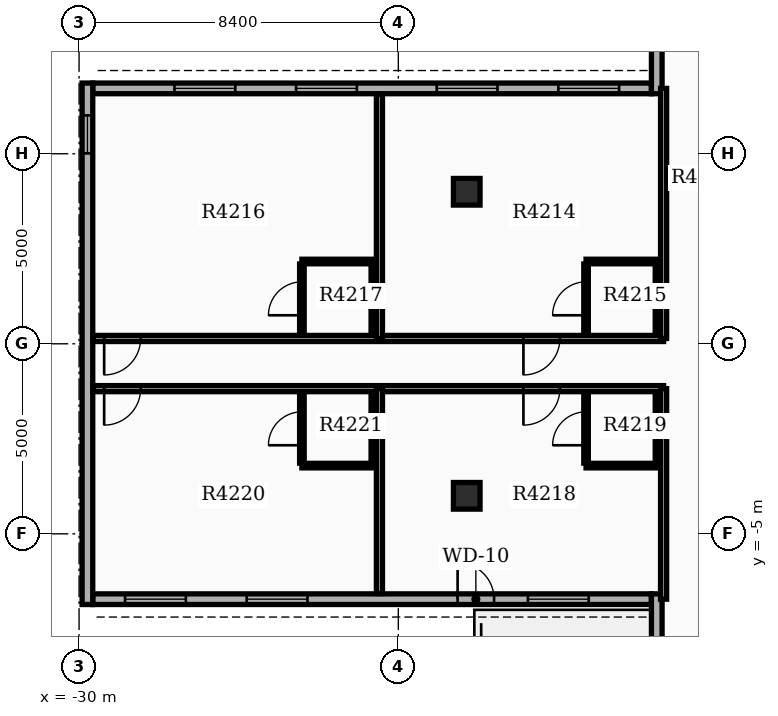
"""IFC4 building model, lengths in metres.
Left out: names, types, materials, properties, quantities, classifications, styles, units other than length and angle.
Written with IfcOpenShell. Run it as: python <this file> out.ifc"""

import sys

from ifc_helpers import new_model, si_unit, direction, frame, frame_2d, origin, origin_2d, place, context, subcontext, project, spatial, rectangle, extrude, element, fill, save


model = new_model("IFC4")
c1 = context("Model", 3, precision=1e-05, world=origin(), true_north=direction((0.0, 1.0)))
c2 = subcontext(c1, "Body", "Model", "MODEL_VIEW")
j1 = project(units=[si_unit("LENGTHUNIT", "METRE"), si_unit("PLANEANGLEUNIT", "RADIAN")], contexts=[c1])
p1 = place(None, origin())
s1 = spatial("IfcSite", under=j1, at=p1, CompositionType="ELEMENT")
p2 = place(p1, origin())
s2 = spatial("IfcBuilding", under=s1, at=p2, CompositionType="ELEMENT")
p3 = place(p2, frame((0.0, 0.0, 265.5)))
s3 = spatial("IfcBuildingStorey", under=s2, at=p3, CompositionType="ELEMENT", Elevation=265.5)
for number, where, z_axis, x_axis in (
    (1, (-19.8, -4.0, 0.0), (0.0, 0.0, 1.0), (1.0, 0.0, 0.0)),
    (2, (-19.8, 4.0, 0.0), (0.0, 0.0, 1.0), (1.0, 0.0, 0.0)),
):
    element("IfcColumn", number, at=place(p3, frame(where, z_axis=z_axis, x_axis=x_axis)), inside=s3, PredefinedType="COLUMN", context=c2, shape_type="SweptSolid", body=[
        extrude(rectangle(XDim=0.7, YDim=0.7, at=origin_2d()), origin(), (0.0, 0.0, 1.0), 3.9),
    ])
p4 = place(p3, frame((-14.94, 6.72, 0.0), z_axis=(0.0, 0.0, 1.0), x_axis=(-1.0, 0.0, 0.0)))
e3 = element("IfcWall", 3, at=p4, inside=s3, PredefinedType="STANDARD", context=c2, shape_type="SweptSolid", body=[
    extrude(rectangle(XDim=14.7, YDim=0.28, at=frame_2d((7.35, 0.0))), origin(), (0.0, 0.0, 1.0), 3.18),
])
p5 = place(p4, frame((0.85, 0.0, 0.8)))
e4 = element("IfcOpeningElement", 4, at=p5, cuts=e3, PredefinedType="OPENING", context=c2, shape_type="SweptSolid", body=[
    extrude(rectangle(XDim=1.6, YDim=1.7, at=frame_2d((0.8, 0.85))), frame((0.0, 0.15, 0.0), z_axis=(0.0, -1.0, 0.0), x_axis=(1.0, 0.0, 0.0)), (0.0, 0.0, 1.0), 0.3),
])
p6 = place(p4, frame((4.05, 0.0, 0.8)))
e5 = element("IfcOpeningElement", 5, at=p6, cuts=e3, PredefinedType="OPENING", context=c2, shape_type="SweptSolid", body=[
    extrude(rectangle(XDim=1.6, YDim=1.7, at=frame_2d((0.8, 0.85))), frame((0.0, 0.15, 0.0), z_axis=(0.0, -1.0, 0.0), x_axis=(1.0, 0.0, 0.0)), (0.0, 0.0, 1.0), 0.3),
])
p7 = place(p4, frame((7.75, 0.0, 0.8)))
e6 = element("IfcOpeningElement", 6, at=p7, cuts=e3, PredefinedType="OPENING", context=c2, shape_type="SweptSolid", body=[
    extrude(rectangle(XDim=1.6, YDim=1.7, at=frame_2d((0.8, 0.85))), frame((0.0, 0.15, 0.0), z_axis=(0.0, -1.0, 0.0), x_axis=(1.0, 0.0, 0.0)), (0.0, 0.0, 1.0), 0.3),
])
p8 = place(p4, frame((10.95, 0.0, 0.8)))
e7 = element("IfcOpeningElement", 7, at=p8, cuts=e3, PredefinedType="OPENING", context=c2, shape_type="SweptSolid", body=[
    extrude(rectangle(XDim=1.6, YDim=1.7, at=frame_2d((0.8, 0.85))), frame((0.0, 0.15, 0.0), z_axis=(0.0, -1.0, 0.0), x_axis=(1.0, 0.0, 0.0)), (0.0, 0.0, 1.0), 0.3),
])
p9 = place(p3, frame((-29.64, -6.72, 0.0), z_axis=(0.0, 0.0, 1.0), x_axis=(1.0, 0.0, 0.0)))
e8 = element("IfcWall", 8, at=p9, inside=s3, PredefinedType="STANDARD", context=c2, shape_type="SweptSolid", body=[
    extrude(rectangle(XDim=14.7, YDim=0.28, at=frame_2d((7.35, 0.0))), origin(), (0.0, 0.0, 1.0), 3.18),
])
p10 = place(p9, frame((0.85, 0.0, 0.8)))
e9 = element("IfcOpeningElement", 9, at=p10, cuts=e8, PredefinedType="OPENING", context=c2, shape_type="SweptSolid", body=[
    extrude(rectangle(XDim=1.6, YDim=1.7, at=frame_2d((0.8, 0.85))), frame((0.0, 0.15, 0.0), z_axis=(0.0, -1.0, 0.0), x_axis=(1.0, 0.0, 0.0)), (0.0, 0.0, 1.0), 0.3),
])
p11 = place(p9, frame((4.05, 0.0, 0.8)))
e10 = element("IfcOpeningElement", 10, at=p11, cuts=e8, PredefinedType="OPENING", context=c2, shape_type="SweptSolid", body=[
    extrude(rectangle(XDim=1.6, YDim=1.7, at=frame_2d((0.8, 0.85))), frame((0.0, 0.15, 0.0), z_axis=(0.0, -1.0, 0.0), x_axis=(1.0, 0.0, 0.0)), (0.0, 0.0, 1.0), 0.3),
])
p12 = place(p9, frame((11.45, 0.0, 0.8)))
e11 = element("IfcOpeningElement", 11, at=p12, cuts=e8, PredefinedType="OPENING", context=c2, shape_type="SweptSolid", body=[
    extrude(rectangle(XDim=1.6, YDim=1.7, at=frame_2d((0.8, 0.85))), frame((0.0, 0.15, 0.0), z_axis=(0.0, -1.0, 0.0), x_axis=(1.0, 0.0, 0.0)), (0.0, 0.0, 1.0), 0.3),
])
p13 = place(p9, frame((9.6, 0.0, 0.0)))
e12 = element("IfcOpeningElement", 12, at=p13, cuts=e8, PredefinedType="OPENING", context=c2, shape_type="SweptSolid", body=[
    extrude(rectangle(XDim=0.96, YDim=2.1, at=frame_2d((0.48, 1.05))), frame((0.0, 0.15, 0.0), z_axis=(0.0, -1.0, 0.0), x_axis=(1.0, 0.0, 0.0)), (0.0, 0.0, 1.0), 0.3),
])
p14 = place(p3, frame((-29.78, 6.86, 0.0), z_axis=(0.0, 0.0, 1.0), x_axis=(0.0, -1.0, 0.0)))
e13 = element("IfcWall", 13, at=p14, inside=s3, PredefinedType="STANDARD", context=c2, shape_type="SweptSolid", body=[
    extrude(rectangle(XDim=13.72, YDim=0.28, at=frame_2d((6.86, 0.0))), origin(), (0.0, 0.0, 1.0), 3.18),
])
p15 = place(p14, frame((0.85, 0.0, 0.85)))
e14 = element("IfcOpeningElement", 14, at=p15, cuts=e13, PredefinedType="OPENING", context=c2, shape_type="SweptSolid", body=[
    extrude(rectangle(XDim=1.0, YDim=1.5, at=frame_2d((0.5, 0.75))), frame((0.0, 0.15, 0.0), z_axis=(0.0, -1.0, 0.0), x_axis=(1.0, 0.0, 0.0)), (0.0, 0.0, 1.0), 0.3),
])
for number, where, z_axis, x_axis in (
    (15, (-14.8, 6.58, 0.0), (0.0, 0.0, 1.0), (0.0, 1.0, 0.0)),
    (16, (-14.8, -6.58, 0.0), (0.0, 0.0, 1.0), (0.0, -1.0, 0.0)),
):
    element("IfcWall", number, at=place(p3, frame(where, z_axis=z_axis, x_axis=x_axis)), inside=s3, PredefinedType="STANDARD", context=c2, shape_type="SweptSolid", body=[
        extrude(rectangle(XDim=6.86, YDim=0.28, at=frame_2d((3.43, 0.0))), origin(), (0.0, 0.0, 1.0), 3.18),
    ])
p16 = place(p3, frame((-14.62, 0.14, 0.0), z_axis=(0.0, 0.0, 1.0), x_axis=(-1.0, 0.0, 0.0)))
e17 = element("IfcWall", 17, at=p16, inside=s3, PredefinedType="PARTITIONING", context=c2, shape_type="SweptSolid", body=[
    extrude(rectangle(XDim=15.012, YDim=0.16, at=frame_2d((7.506, 0.0))), origin(), (0.0, 0.0, 1.0), 3.17),
])
p17 = place(p16, frame((2.728, 0.0, 0.0)))
e18 = element("IfcOpeningElement", 18, at=p17, cuts=e17, PredefinedType="OPENING", context=c2, shape_type="SweptSolid", body=[
    extrude(rectangle(XDim=0.96, YDim=2.15, at=frame_2d((0.48, 1.075))), frame((0.0, 0.09, 0.0), z_axis=(0.0, -1.0, 0.0), x_axis=(1.0, 0.0, 0.0)), (0.0, 0.0, 1.0), 0.18),
])
p18 = place(p16, frame((13.76, 0.0, 0.0)))
e19 = element("IfcOpeningElement", 19, at=p18, cuts=e17, PredefinedType="OPENING", context=c2, shape_type="SweptSolid", body=[
    extrude(rectangle(XDim=0.96, YDim=2.15, at=frame_2d((0.48, 1.075))), frame((0.0, 0.09, 0.0), z_axis=(0.0, -1.0, 0.0), x_axis=(1.0, 0.0, 0.0)), (0.0, 0.0, 1.0), 0.18),
])
p19 = place(p3, frame((-14.62, 0.14, 0.0), z_axis=(0.0, 0.0, 1.0), x_axis=(0.0, 1.0, 0.0)))
e20 = element("IfcWall", 20, at=p19, inside=s3, PredefinedType="PARTITIONING", context=c2, shape_type="SweptSolid", body=[
    extrude(rectangle(XDim=6.58, YDim=0.16, at=frame_2d((3.29, 0.0))), origin(), (0.0, 0.0, 1.0), 3.17),
])
p20 = place(p3, frame((-22.097, 0.14, 0.0), z_axis=(0.0, 0.0, 1.0), x_axis=(0.0, 1.0, 0.0)))
e21 = element("IfcWall", 21, at=p20, inside=s3, PredefinedType="PARTITIONING", context=c2, shape_type="SweptSolid", body=[
    extrude(rectangle(XDim=6.432, YDim=0.16, at=frame_2d((3.216, 0.0))), origin(), (0.0, 0.0, 1.0), 3.17),
])
p21 = place(p3, frame((-16.66, 0.28, 0.0), z_axis=(0.0, 0.0, 1.0), x_axis=(0.0, 1.0, 0.0)))
e22 = element("IfcWall", 22, at=p21, inside=s3, PredefinedType="PARTITIONING", context=c2, shape_type="SweptSolid", body=[
    extrude(rectangle(XDim=1.82, YDim=0.12, at=frame_2d((0.91, 0.0))), origin(), (0.0, 0.0, 1.0), 3.17),
])
p22 = place(p21, frame((0.47, 0.0, 0.0)))
e23 = element("IfcOpeningElement", 23, at=p22, cuts=e22, PredefinedType="OPENING", context=c2, shape_type="SweptSolid", body=[
    extrude(rectangle(XDim=0.88, YDim=2.1, at=frame_2d((0.44, 1.05))), frame((0.0, 0.07, 0.0), z_axis=(0.0, -1.0, 0.0), x_axis=(1.0, 0.0, 0.0)), (0.0, 0.0, 1.0), 0.14),
])
p23 = place(p3, frame((-14.78, 0.28, 0.0), z_axis=(0.0, 0.0, 1.0), x_axis=(0.0, 1.0, 0.0)))
e24 = element("IfcWall", 24, at=p23, inside=s3, PredefinedType="PARTITIONING", context=c2, shape_type="SweptSolid", body=[
    extrude(rectangle(XDim=1.82, YDim=0.12, at=frame_2d((0.91, 0.0))), origin(), (0.0, 0.0, 1.0), 3.17),
])
p24 = place(p3, frame((-14.78, 2.165, 0.0), z_axis=(0.0, 0.0, 1.0), x_axis=(-1.0, 0.0, 0.0)))
e25 = element("IfcWall", 25, at=p24, inside=s3, PredefinedType="PARTITIONING", context=c2, shape_type="SweptSolid", body=[
    extrude(rectangle(XDim=1.88, YDim=0.12, at=frame_2d((0.94, 0.0))), origin(), (0.0, 0.0, 1.0), 3.17),
])
p25 = place(p3, frame((-24.137, 0.28, 0.0), z_axis=(0.0, 0.0, 1.0), x_axis=(0.0, 1.0, 0.0)))
e26 = element("IfcWall", 26, at=p25, inside=s3, PredefinedType="PARTITIONING", context=c2, shape_type="SweptSolid", body=[
    extrude(rectangle(XDim=1.82, YDim=0.12, at=frame_2d((0.91, 0.0))), origin(), (0.0, 0.0, 1.0), 3.17),
])
p26 = place(p25, frame((0.47, 0.0, 0.0)))
e27 = element("IfcOpeningElement", 27, at=p26, cuts=e26, PredefinedType="OPENING", context=c2, shape_type="SweptSolid", body=[
    extrude(rectangle(XDim=0.88, YDim=2.1, at=frame_2d((0.44, 1.05))), frame((0.0, 0.07, 0.0), z_axis=(0.0, -1.0, 0.0), x_axis=(1.0, 0.0, 0.0)), (0.0, 0.0, 1.0), 0.14),
])
p27 = place(p3, frame((-22.257, 0.28, 0.0), z_axis=(0.0, 0.0, 1.0), x_axis=(0.0, 1.0, 0.0)))
e28 = element("IfcWall", 28, at=p27, inside=s3, PredefinedType="PARTITIONING", context=c2, shape_type="SweptSolid", body=[
    extrude(rectangle(XDim=1.82, YDim=0.12, at=frame_2d((0.91, 0.0))), origin(), (0.0, 0.0, 1.0), 3.17),
])
p28 = place(p3, frame((-22.257, 2.165, 0.0), z_axis=(0.0, 0.0, 1.0), x_axis=(-1.0, 0.0, 0.0)))
e29 = element("IfcWall", 29, at=p28, inside=s3, PredefinedType="PARTITIONING", context=c2, shape_type="SweptSolid", body=[
    extrude(rectangle(XDim=1.88, YDim=0.12, at=frame_2d((0.94, 0.0))), origin(), (0.0, 0.0, 1.0), 3.17),
])
p29 = place(p3, frame((-14.62, -1.18, 0.0), z_axis=(0.0, 0.0, 1.0), x_axis=(-1.0, 0.0, 0.0)))
e30 = element("IfcWall", 30, at=p29, inside=s3, PredefinedType="PARTITIONING", context=c2, shape_type="SweptSolid", body=[
    extrude(rectangle(XDim=15.012, YDim=0.16, at=frame_2d((7.506, 0.0))), origin(), (0.0, 0.0, 1.0), 3.17),
])
p30 = place(p29, frame((2.728, 0.0, 0.0)))
e31 = element("IfcOpeningElement", 31, at=p30, cuts=e30, PredefinedType="OPENING", context=c2, shape_type="SweptSolid", body=[
    extrude(rectangle(XDim=0.96, YDim=2.15, at=frame_2d((0.48, 1.075))), frame((0.0, 0.09, 0.0), z_axis=(0.0, -1.0, 0.0), x_axis=(1.0, 0.0, 0.0)), (0.0, 0.0, 1.0), 0.18),
])
p31 = place(p29, frame((13.76, 0.0, 0.0)))
e32 = element("IfcOpeningElement", 32, at=p31, cuts=e30, PredefinedType="OPENING", context=c2, shape_type="SweptSolid", body=[
    extrude(rectangle(XDim=0.96, YDim=2.15, at=frame_2d((0.48, 1.075))), frame((0.0, 0.09, 0.0), z_axis=(0.0, -1.0, 0.0), x_axis=(1.0, 0.0, 0.0)), (0.0, 0.0, 1.0), 0.18),
])
p32 = place(p3, frame((-14.62, -1.18, 0.0), z_axis=(0.0, 0.0, 1.0), x_axis=(0.0, -1.0, 0.0)))
e33 = element("IfcWall", 33, at=p32, inside=s3, PredefinedType="PARTITIONING", context=c2, shape_type="SweptSolid", body=[
    extrude(rectangle(XDim=5.54, YDim=0.16, at=frame_2d((2.77, 0.0))), origin(), (0.0, 0.0, 1.0), 3.17),
])
p33 = place(p3, frame((-22.097, -1.18, 0.0), z_axis=(0.0, 0.0, 1.0), x_axis=(0.0, -1.0, 0.0)))
e34 = element("IfcWall", 34, at=p33, inside=s3, PredefinedType="PARTITIONING", context=c2, shape_type="SweptSolid", body=[
    extrude(rectangle(XDim=5.392, YDim=0.16, at=frame_2d((2.696, 0.0))), origin(), (0.0, 0.0, 1.0), 3.17),
])
p34 = place(p3, frame((-16.66, -3.14, 0.0), z_axis=(0.0, 0.0, 1.0), x_axis=(0.0, 1.0, 0.0)))
e35 = element("IfcWall", 35, at=p34, inside=s3, PredefinedType="PARTITIONING", context=c2, shape_type="SweptSolid", body=[
    extrude(rectangle(XDim=1.82, YDim=0.12, at=frame_2d((0.91, 0.0))), origin(), (0.0, 0.0, 1.0), 3.17),
])
p35 = place(p34, frame((0.47, 0.0, 0.0)))
e36 = element("IfcOpeningElement", 36, at=p35, cuts=e35, PredefinedType="OPENING", context=c2, shape_type="SweptSolid", body=[
    extrude(rectangle(XDim=0.88, YDim=2.1, at=frame_2d((0.44, 1.05))), frame((0.0, 0.07, 0.0), z_axis=(0.0, -1.0, 0.0), x_axis=(1.0, 0.0, 0.0)), (0.0, 0.0, 1.0), 0.14),
])
p36 = place(p3, frame((-14.78, -3.14, 0.0), z_axis=(0.0, 0.0, 1.0), x_axis=(0.0, 1.0, 0.0)))
e37 = element("IfcWall", 37, at=p36, inside=s3, PredefinedType="PARTITIONING", context=c2, shape_type="SweptSolid", body=[
    extrude(rectangle(XDim=1.82, YDim=0.12, at=frame_2d((0.91, 0.0))), origin(), (0.0, 0.0, 1.0), 3.17),
])
p37 = place(p3, frame((-14.78, -3.205, 0.0), z_axis=(0.0, 0.0, 1.0), x_axis=(-1.0, 0.0, 0.0)))
e38 = element("IfcWall", 38, at=p37, inside=s3, PredefinedType="PARTITIONING", context=c2, shape_type="SweptSolid", body=[
    extrude(rectangle(XDim=1.88, YDim=0.12, at=frame_2d((0.94, 0.0))), origin(), (0.0, 0.0, 1.0), 3.17),
])
p38 = place(p3, frame((-24.137, -3.14, 0.0), z_axis=(0.0, 0.0, 1.0), x_axis=(0.0, 1.0, 0.0)))
e39 = element("IfcWall", 39, at=p38, inside=s3, PredefinedType="PARTITIONING", context=c2, shape_type="SweptSolid", body=[
    extrude(rectangle(XDim=1.82, YDim=0.12, at=frame_2d((0.91, 0.0))), origin(), (0.0, 0.0, 1.0), 3.17),
])
p39 = place(p38, frame((0.47, 0.0, 0.0)))
e40 = element("IfcOpeningElement", 40, at=p39, cuts=e39, PredefinedType="OPENING", context=c2, shape_type="SweptSolid", body=[
    extrude(rectangle(XDim=0.88, YDim=2.1, at=frame_2d((0.44, 1.05))), frame((0.0, 0.07, 0.0), z_axis=(0.0, -1.0, 0.0), x_axis=(1.0, 0.0, 0.0)), (0.0, 0.0, 1.0), 0.14),
])
p40 = place(p3, frame((-22.257, -3.14, 0.0), z_axis=(0.0, 0.0, 1.0), x_axis=(0.0, 1.0, 0.0)))
e41 = element("IfcWall", 41, at=p40, inside=s3, PredefinedType="PARTITIONING", context=c2, shape_type="SweptSolid", body=[
    extrude(rectangle(XDim=1.82, YDim=0.12, at=frame_2d((0.91, 0.0))), origin(), (0.0, 0.0, 1.0), 3.17),
])
p41 = place(p3, frame((-22.257, -3.205, 0.0), z_axis=(0.0, 0.0, 1.0), x_axis=(-1.0, 0.0, 0.0)))
e42 = element("IfcWall", 42, at=p41, inside=s3, PredefinedType="PARTITIONING", context=c2, shape_type="SweptSolid", body=[
    extrude(rectangle(XDim=1.88, YDim=0.12, at=frame_2d((0.94, 0.0))), origin(), (0.0, 0.0, 1.0), 3.17),
])
p42 = place(p5, origin())
e43 = element("IfcWindow", 43, at=p42, inside=s3, PartitioningType="SINGLE_PANEL", PredefinedType="WINDOW", context=c2, shape_type="SweptSolid", body=[
    extrude(rectangle(XDim=1.6, YDim=1.7, at=frame_2d((0.8, 0.85))), frame((0.0, 0.03, 0.0), z_axis=(0.0, -1.0, 0.0), x_axis=(1.0, 0.0, 0.0)), (0.0, 0.0, 1.0), 0.06),
])
fill(e4, e43)
p43 = place(p6, origin())
e44 = element("IfcWindow", 44, at=p43, inside=s3, PartitioningType="SINGLE_PANEL", PredefinedType="WINDOW", context=c2, shape_type="SweptSolid", body=[
    extrude(rectangle(XDim=1.6, YDim=1.7, at=frame_2d((0.8, 0.85))), frame((0.0, 0.03, 0.0), z_axis=(0.0, -1.0, 0.0), x_axis=(1.0, 0.0, 0.0)), (0.0, 0.0, 1.0), 0.06),
])
fill(e5, e44)
p44 = place(p7, origin())
e45 = element("IfcWindow", 45, at=p44, inside=s3, PartitioningType="SINGLE_PANEL", PredefinedType="WINDOW", context=c2, shape_type="SweptSolid", body=[
    extrude(rectangle(XDim=1.6, YDim=1.7, at=frame_2d((0.8, 0.85))), frame((0.0, 0.03, 0.0), z_axis=(0.0, -1.0, 0.0), x_axis=(1.0, 0.0, 0.0)), (0.0, 0.0, 1.0), 0.06),
])
fill(e6, e45)
p45 = place(p8, origin())
e46 = element("IfcWindow", 46, at=p45, inside=s3, PartitioningType="SINGLE_PANEL", PredefinedType="WINDOW", context=c2, shape_type="SweptSolid", body=[
    extrude(rectangle(XDim=1.6, YDim=1.7, at=frame_2d((0.8, 0.85))), frame((0.0, 0.03, 0.0), z_axis=(0.0, -1.0, 0.0), x_axis=(1.0, 0.0, 0.0)), (0.0, 0.0, 1.0), 0.06),
])
fill(e7, e46)
p46 = place(p10, origin())
e47 = element("IfcWindow", 47, at=p46, inside=s3, PartitioningType="SINGLE_PANEL", PredefinedType="WINDOW", context=c2, shape_type="SweptSolid", body=[
    extrude(rectangle(XDim=1.6, YDim=1.7, at=frame_2d((0.8, 0.85))), frame((0.0, 0.03, 0.0), z_axis=(0.0, -1.0, 0.0), x_axis=(1.0, 0.0, 0.0)), (0.0, 0.0, 1.0), 0.06),
])
fill(e9, e47)
p47 = place(p11, origin())
e48 = element("IfcWindow", 48, at=p47, inside=s3, PartitioningType="SINGLE_PANEL", PredefinedType="WINDOW", context=c2, shape_type="SweptSolid", body=[
    extrude(rectangle(XDim=1.6, YDim=1.7, at=frame_2d((0.8, 0.85))), frame((0.0, 0.03, 0.0), z_axis=(0.0, -1.0, 0.0), x_axis=(1.0, 0.0, 0.0)), (0.0, 0.0, 1.0), 0.06),
])
fill(e10, e48)
p48 = place(p12, origin())
e49 = element("IfcWindow", 49, at=p48, inside=s3, PartitioningType="SINGLE_PANEL", PredefinedType="WINDOW", context=c2, shape_type="SweptSolid", body=[
    extrude(rectangle(XDim=1.6, YDim=1.7, at=frame_2d((0.8, 0.85))), frame((0.0, 0.03, 0.0), z_axis=(0.0, -1.0, 0.0), x_axis=(1.0, 0.0, 0.0)), (0.0, 0.0, 1.0), 0.06),
])
fill(e11, e49)
p49 = place(p15, origin())
e50 = element("IfcWindow", 50, at=p49, inside=s3, PartitioningType="SINGLE_PANEL", PredefinedType="WINDOW", context=c2, shape_type="SweptSolid", body=[
    extrude(rectangle(XDim=1.0, YDim=1.5, at=frame_2d((0.5, 0.75))), frame((0.0, 0.03, 0.0), z_axis=(0.0, -1.0, 0.0), x_axis=(1.0, 0.0, 0.0)), (0.0, 0.0, 1.0), 0.06),
])
fill(e14, e50)
p50 = place(p13, origin())
e51 = element("IfcDoor", 51, at=p50, inside=s3, OperationType="SINGLE_SWING_LEFT", PredefinedType="DOOR", context=c2, shape_type="SweptSolid", body=[
    extrude(rectangle(XDim=0.96, YDim=2.1, at=frame_2d((0.48, 1.05))), frame((0.0, 0.025, 0.0), z_axis=(0.0, -1.0, 0.0), x_axis=(1.0, 0.0, 0.0)), (0.0, 0.0, 1.0), 0.05),
])
fill(e12, e51)
p51 = place(p17, origin())
e52 = element("IfcDoor", 52, at=p51, inside=s3, OperationType="SINGLE_SWING_RIGHT", PredefinedType="DOOR", context=c2, shape_type="SweptSolid", body=[
    extrude(rectangle(XDim=0.96, YDim=2.15, at=frame_2d((0.48, 1.075))), frame((0.0, 0.025, 0.0), z_axis=(0.0, -1.0, 0.0), x_axis=(1.0, 0.0, 0.0)), (0.0, 0.0, 1.0), 0.05),
])
fill(e18, e52)
p52 = place(p22, origin())
e53 = element("IfcDoor", 53, at=p52, inside=s3, OperationType="SINGLE_SWING_LEFT", PredefinedType="DOOR", context=c2, shape_type="SweptSolid", body=[
    extrude(rectangle(XDim=0.88, YDim=2.1, at=frame_2d((0.44, 1.05))), frame((0.0, 0.025, 0.0), z_axis=(0.0, -1.0, 0.0), x_axis=(1.0, 0.0, 0.0)), (0.0, 0.0, 1.0), 0.05),
])
fill(e23, e53)
p53 = place(p18, origin())
e54 = element("IfcDoor", 54, at=p53, inside=s3, OperationType="SINGLE_SWING_RIGHT", PredefinedType="DOOR", context=c2, shape_type="SweptSolid", body=[
    extrude(rectangle(XDim=0.96, YDim=2.15, at=frame_2d((0.48, 1.075))), frame((0.0, 0.025, 0.0), z_axis=(0.0, -1.0, 0.0), x_axis=(1.0, 0.0, 0.0)), (0.0, 0.0, 1.0), 0.05),
])
fill(e19, e54)
p54 = place(p26, origin())
e55 = element("IfcDoor", 55, at=p54, inside=s3, OperationType="SINGLE_SWING_LEFT", PredefinedType="DOOR", context=c2, shape_type="SweptSolid", body=[
    extrude(rectangle(XDim=0.88, YDim=2.1, at=frame_2d((0.44, 1.05))), frame((0.0, 0.025, 0.0), z_axis=(0.0, -1.0, 0.0), x_axis=(1.0, 0.0, 0.0)), (0.0, 0.0, 1.0), 0.05),
])
fill(e27, e55)
p55 = place(p30, origin())
e56 = element("IfcDoor", 56, at=p55, inside=s3, OperationType="SINGLE_SWING_RIGHT", PredefinedType="DOOR", context=c2, shape_type="SweptSolid", body=[
    extrude(rectangle(XDim=0.96, YDim=2.15, at=frame_2d((0.48, 1.075))), frame((0.0, 0.025, 0.0), z_axis=(0.0, -1.0, 0.0), x_axis=(1.0, 0.0, 0.0)), (0.0, 0.0, 1.0), 0.05),
])
fill(e31, e56)
p56 = place(p35, origin())
e57 = element("IfcDoor", 57, at=p56, inside=s3, OperationType="SINGLE_SWING_LEFT", PredefinedType="DOOR", context=c2, shape_type="SweptSolid", body=[
    extrude(rectangle(XDim=0.88, YDim=2.1, at=frame_2d((0.44, 1.05))), frame((0.0, 0.025, 0.0), z_axis=(0.0, -1.0, 0.0), x_axis=(1.0, 0.0, 0.0)), (0.0, 0.0, 1.0), 0.05),
])
fill(e36, e57)
p57 = place(p31, origin())
e58 = element("IfcDoor", 58, at=p57, inside=s3, OperationType="SINGLE_SWING_RIGHT", PredefinedType="DOOR", context=c2, shape_type="SweptSolid", body=[
    extrude(rectangle(XDim=0.96, YDim=2.15, at=frame_2d((0.48, 1.075))), frame((0.0, 0.025, 0.0), z_axis=(0.0, -1.0, 0.0), x_axis=(1.0, 0.0, 0.0)), (0.0, 0.0, 1.0), 0.05),
])
fill(e32, e58)
p58 = place(p39, origin())
e59 = element("IfcDoor", 59, at=p58, inside=s3, OperationType="SINGLE_SWING_LEFT", PredefinedType="DOOR", context=c2, shape_type="SweptSolid", body=[
    extrude(rectangle(XDim=0.88, YDim=2.1, at=frame_2d((0.44, 1.05))), frame((0.0, 0.025, 0.0), z_axis=(0.0, -1.0, 0.0), x_axis=(1.0, 0.0, 0.0)), (0.0, 0.0, 1.0), 0.05),
])
fill(e40, e59)
save(model, sys.argv[1])
